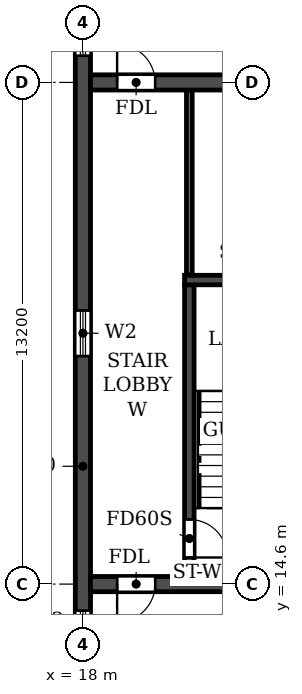
"""IFC4 building model, lengths in metres.
Left out: names, types, materials, properties, quantities, classifications, styles, units other than length and angle.
Written with IfcOpenShell. Run it as: python <this file> out.ifc"""

import sys

from ifc_helpers import new_model, si_unit, direction, frame, frame_2d, origin, place, context, subcontext, project, spatial, rectangle, extrude, element, fill, save


model = new_model("IFC4")
c1 = context("Model", 3, precision=1e-05, world=origin(), true_north=direction((0.0, 1.0)))
c2 = subcontext(c1, "Body", "Model", "MODEL_VIEW")
j1 = project(units=[si_unit("LENGTHUNIT", "METRE"), si_unit("PLANEANGLEUNIT", "RADIAN")], contexts=[c1])
p1 = place(None, origin())
s1 = spatial("IfcSite", under=j1, at=p1, CompositionType="ELEMENT")
p2 = place(p1, origin())
s2 = spatial("IfcBuilding", under=s1, at=p2, CompositionType="ELEMENT")
p3 = place(p2, frame((0.0, 0.0, 181.8)))
s3 = spatial("IfcBuildingStorey", under=s2, at=p3, CompositionType="ELEMENT", Elevation=181.8)
p4 = place(p3, frame((18.0, 4.683, 0.0), z_axis=(0.0, 0.0, 1.0), x_axis=(0.0, 1.0, 0.0)))
e1 = element("IfcWall", 1, at=p4, inside=s3, PredefinedType="SHEAR", context=c2, shape_type="SweptSolid", body=[
    extrude(rectangle(XDim=31.834, YDim=0.4, at=frame_2d((15.917, 0.0))), origin(), (0.0, 0.0, 1.0), 3.08),
])
p5 = place(p4, frame((23.817, 0.0, 0.9)))
e2 = element("IfcOpeningElement", 2, at=p5, cuts=e1, PredefinedType="OPENING", context=c2, shape_type="SweptSolid", body=[
    extrude(rectangle(XDim=1.2, YDim=1.5, at=frame_2d((0.6, 0.75))), frame((0.0, 0.21, 0.0), z_axis=(0.0, -1.0, 0.0), x_axis=(1.0, 0.0, 0.0)), (0.0, 0.0, 1.0), 0.42),
])
p6 = place(p4, frame((8.017, 0.0, 0.9)))
e3 = element("IfcOpeningElement", 3, at=p6, cuts=e1, PredefinedType="OPENING", context=c2, shape_type="SweptSolid", body=[
    extrude(rectangle(XDim=1.2, YDim=1.5, at=frame_2d((0.6, 0.75))), frame((0.0, 0.21, 0.0), z_axis=(0.0, -1.0, 0.0), x_axis=(1.0, 0.0, 0.0)), (0.0, 0.0, 1.0), 0.42),
])
p7 = place(p4, frame((27.694, 0.0, 0.6)))
e4 = element("IfcOpeningElement", 4, at=p7, cuts=e1, PredefinedType="OPENING", context=c2, shape_type="SweptSolid", body=[
    extrude(rectangle(XDim=2.2, YDim=1.8, at=frame_2d((1.1, 0.9))), frame((0.0, 0.21, 0.0), z_axis=(0.0, -1.0, 0.0), x_axis=(1.0, 0.0, 0.0)), (0.0, 0.0, 1.0), 0.42),
])
p8 = place(p4, frame((2.541, 0.0, 0.6)))
e5 = element("IfcOpeningElement", 5, at=p8, cuts=e1, PredefinedType="OPENING", context=c2, shape_type="SweptSolid", body=[
    extrude(rectangle(XDim=2.2, YDim=1.8, at=frame_2d((1.1, 0.9))), frame((0.0, 0.21, 0.0), z_axis=(0.0, -1.0, 0.0), x_axis=(1.0, 0.0, 0.0)), (0.0, 0.0, 1.0), 0.42),
])
p9 = place(p4, frame((15.917, 0.0, 0.9)))
e6 = element("IfcOpeningElement", 6, at=p9, cuts=e1, PredefinedType="OPENING", context=c2, shape_type="SweptSolid", body=[
    extrude(rectangle(XDim=1.2, YDim=1.5, at=frame_2d((0.6, 0.75))), frame((0.0, 0.21, 0.0), z_axis=(0.0, -1.0, 0.0), x_axis=(1.0, 0.0, 0.0)), (0.0, 0.0, 1.0), 0.42),
])
p10 = place(p3, frame((18.2, 14.6, 0.0), z_axis=(0.0, 0.0, 1.0), x_axis=(1.0, 0.0, 0.0)))
e7 = element("IfcWall", 7, at=p10, inside=s3, PredefinedType="SOLIDWALL", context=c2, shape_type="SweptSolid", body=[
    extrude(rectangle(XDim=65.6, YDim=0.4, at=frame_2d((32.8, 0.0))), origin(), (0.0, 0.0, 1.0), 3.08),
])
p11 = place(p10, frame((0.7, 0.0, 0.0)))
e8 = element("IfcOpeningElement", 8, at=p11, cuts=e7, PredefinedType="OPENING", context=c2, shape_type="SweptSolid", body=[
    extrude(rectangle(XDim=1.0, YDim=2.1, at=frame_2d((0.5, 1.05))), frame((0.0, 0.21, 0.0), z_axis=(0.0, -1.0, 0.0), x_axis=(1.0, 0.0, 0.0)), (0.0, 0.0, 1.0), 0.42),
])
p12 = place(p10, frame((8.6, 0.0, 0.0)))
e9 = element("IfcOpeningElement", 9, at=p12, cuts=e7, PredefinedType="OPENING", context=c2, shape_type="SweptSolid", body=[
    extrude(rectangle(XDim=1.0, YDim=2.1, at=frame_2d((0.5, 1.05))), frame((0.0, 0.21, 0.0), z_axis=(0.0, -1.0, 0.0), x_axis=(1.0, 0.0, 0.0)), (0.0, 0.0, 1.0), 0.42),
])
p13 = place(p10, frame((13.2, 0.0, 0.0)))
e10 = element("IfcOpeningElement", 10, at=p13, cuts=e7, PredefinedType="OPENING", context=c2, shape_type="SweptSolid", body=[
    extrude(rectangle(XDim=1.0, YDim=2.1, at=frame_2d((0.5, 1.05))), frame((0.0, 0.21, 0.0), z_axis=(0.0, -1.0, 0.0), x_axis=(1.0, 0.0, 0.0)), (0.0, 0.0, 1.0), 0.42),
])
p14 = place(p10, frame((24.5, 0.0, 0.0)))
e11 = element("IfcOpeningElement", 11, at=p14, cuts=e7, PredefinedType="OPENING", context=c2, shape_type="SweptSolid", body=[
    extrude(rectangle(XDim=1.0, YDim=2.1, at=frame_2d((0.5, 1.05))), frame((0.0, 0.21, 0.0), z_axis=(0.0, -1.0, 0.0), x_axis=(1.0, 0.0, 0.0)), (0.0, 0.0, 1.0), 0.42),
])
p15 = place(p10, frame((28.4, 0.0, 0.0)))
e12 = element("IfcOpeningElement", 12, at=p15, cuts=e7, PredefinedType="OPENING", context=c2, shape_type="SweptSolid", body=[
    extrude(rectangle(XDim=1.0, YDim=2.1, at=frame_2d((0.5, 1.05))), frame((0.0, 0.21, 0.0), z_axis=(0.0, -1.0, 0.0), x_axis=(1.0, 0.0, 0.0)), (0.0, 0.0, 1.0), 0.42),
])
p16 = place(p10, frame((32.3, 0.0, 0.0)))
e13 = element("IfcOpeningElement", 13, at=p16, cuts=e7, PredefinedType="OPENING", context=c2, shape_type="SweptSolid", body=[
    extrude(rectangle(XDim=1.0, YDim=2.1, at=frame_2d((0.5, 1.05))), frame((0.0, 0.21, 0.0), z_axis=(0.0, -1.0, 0.0), x_axis=(1.0, 0.0, 0.0)), (0.0, 0.0, 1.0), 0.42),
])
p17 = place(p10, frame((34.9, 0.0, 0.0)))
e14 = element("IfcOpeningElement", 14, at=p17, cuts=e7, PredefinedType="OPENING", context=c2, shape_type="SweptSolid", body=[
    extrude(rectangle(XDim=1.0, YDim=2.1, at=frame_2d((0.5, 1.05))), frame((0.0, 0.21, 0.0), z_axis=(0.0, -1.0, 0.0), x_axis=(1.0, 0.0, 0.0)), (0.0, 0.0, 1.0), 0.42),
])
p18 = place(p10, frame((38.8, 0.0, 0.0)))
e15 = element("IfcOpeningElement", 15, at=p18, cuts=e7, PredefinedType="OPENING", context=c2, shape_type="SweptSolid", body=[
    extrude(rectangle(XDim=1.0, YDim=2.1, at=frame_2d((0.5, 1.05))), frame((0.0, 0.21, 0.0), z_axis=(0.0, -1.0, 0.0), x_axis=(1.0, 0.0, 0.0)), (0.0, 0.0, 1.0), 0.42),
])
p19 = place(p10, frame((51.4, 0.0, 0.0)))
e16 = element("IfcOpeningElement", 16, at=p19, cuts=e7, PredefinedType="OPENING", context=c2, shape_type="SweptSolid", body=[
    extrude(rectangle(XDim=1.0, YDim=2.1, at=frame_2d((0.5, 1.05))), frame((0.0, 0.21, 0.0), z_axis=(0.0, -1.0, 0.0), x_axis=(1.0, 0.0, 0.0)), (0.0, 0.0, 1.0), 0.42),
])
p20 = place(p10, frame((56.0, 0.0, 0.0)))
e17 = element("IfcOpeningElement", 17, at=p20, cuts=e7, PredefinedType="OPENING", context=c2, shape_type="SweptSolid", body=[
    extrude(rectangle(XDim=1.0, YDim=2.1, at=frame_2d((0.5, 1.05))), frame((0.0, 0.21, 0.0), z_axis=(0.0, -1.0, 0.0), x_axis=(1.0, 0.0, 0.0)), (0.0, 0.0, 1.0), 0.42),
])
p21 = place(p10, frame((63.9, 0.0, 0.0)))
e18 = element("IfcOpeningElement", 18, at=p21, cuts=e7, PredefinedType="OPENING", context=c2, shape_type="SweptSolid", body=[
    extrude(rectangle(XDim=1.0, YDim=2.1, at=frame_2d((0.5, 1.05))), frame((0.0, 0.21, 0.0), z_axis=(0.0, -1.0, 0.0), x_axis=(1.0, 0.0, 0.0)), (0.0, 0.0, 1.0), 0.42),
])
p22 = place(p3, frame((18.2, 27.8, 0.0), z_axis=(0.0, 0.0, 1.0), x_axis=(1.0, 0.0, 0.0)))
e19 = element("IfcWall", 19, at=p22, inside=s3, PredefinedType="SOLIDWALL", context=c2, shape_type="SweptSolid", body=[
    extrude(rectangle(XDim=65.6, YDim=0.4, at=frame_2d((32.8, 0.0))), origin(), (0.0, 0.0, 1.0), 3.08),
])
p23 = place(p22, frame((0.7, 0.0, 0.0)))
e20 = element("IfcOpeningElement", 20, at=p23, cuts=e19, PredefinedType="OPENING", context=c2, shape_type="SweptSolid", body=[
    extrude(rectangle(XDim=1.0, YDim=2.1, at=frame_2d((0.5, 1.05))), frame((0.0, 0.21, 0.0), z_axis=(0.0, -1.0, 0.0), x_axis=(1.0, 0.0, 0.0)), (0.0, 0.0, 1.0), 0.42),
])
p24 = place(p22, frame((4.05, 0.0, 0.0)))
e21 = element("IfcOpeningElement", 21, at=p24, cuts=e19, PredefinedType="OPENING", context=c2, shape_type="SweptSolid", body=[
    extrude(rectangle(XDim=0.9, YDim=2.1, at=frame_2d((0.45, 1.05))), frame((0.0, 0.21, 0.0), z_axis=(0.0, -1.0, 0.0), x_axis=(1.0, 0.0, 0.0)), (0.0, 0.0, 1.0), 0.42),
])
p25 = place(p22, frame((13.25, 0.0, 0.0)))
e22 = element("IfcOpeningElement", 22, at=p25, cuts=e19, PredefinedType="OPENING", context=c2, shape_type="SweptSolid", body=[
    extrude(rectangle(XDim=0.9, YDim=2.1, at=frame_2d((0.45, 1.05))), frame((0.0, 0.21, 0.0), z_axis=(0.0, -1.0, 0.0), x_axis=(1.0, 0.0, 0.0)), (0.0, 0.0, 1.0), 0.42),
])
p26 = place(p22, frame((19.0, 0.0, 0.0)))
e23 = element("IfcOpeningElement", 23, at=p26, cuts=e19, PredefinedType="OPENING", context=c2, shape_type="SweptSolid", body=[
    extrude(rectangle(XDim=1.0, YDim=2.1, at=frame_2d((0.5, 1.05))), frame((0.0, 0.21, 0.0), z_axis=(0.0, -1.0, 0.0), x_axis=(1.0, 0.0, 0.0)), (0.0, 0.0, 1.0), 0.42),
])
p27 = place(p22, frame((24.2, 0.0, 0.0)))
e24 = element("IfcOpeningElement", 24, at=p27, cuts=e19, PredefinedType="OPENING", context=c2, shape_type="SweptSolid", body=[
    extrude(rectangle(XDim=1.0, YDim=2.1, at=frame_2d((0.5, 1.05))), frame((0.0, 0.21, 0.0), z_axis=(0.0, -1.0, 0.0), x_axis=(1.0, 0.0, 0.0)), (0.0, 0.0, 1.0), 0.42),
])
p28 = place(p22, frame((29.4, 0.0, 0.0)))
e25 = element("IfcOpeningElement", 25, at=p28, cuts=e19, PredefinedType="OPENING", context=c2, shape_type="SweptSolid", body=[
    extrude(rectangle(XDim=1.0, YDim=2.1, at=frame_2d((0.5, 1.05))), frame((0.0, 0.21, 0.0), z_axis=(0.0, -1.0, 0.0), x_axis=(1.0, 0.0, 0.0)), (0.0, 0.0, 1.0), 0.42),
])
p29 = place(p22, frame((32.3, 0.0, 0.0)))
e26 = element("IfcOpeningElement", 26, at=p29, cuts=e19, PredefinedType="OPENING", context=c2, shape_type="SweptSolid", body=[
    extrude(rectangle(XDim=1.0, YDim=2.1, at=frame_2d((0.5, 1.05))), frame((0.0, 0.21, 0.0), z_axis=(0.0, -1.0, 0.0), x_axis=(1.0, 0.0, 0.0)), (0.0, 0.0, 1.0), 0.42),
])
p30 = place(p22, frame((36.5, 0.0, 0.0)))
e27 = element("IfcOpeningElement", 27, at=p30, cuts=e19, PredefinedType="OPENING", context=c2, shape_type="SweptSolid", body=[
    extrude(rectangle(XDim=1.0, YDim=2.1, at=frame_2d((0.5, 1.05))), frame((0.0, 0.21, 0.0), z_axis=(0.0, -1.0, 0.0), x_axis=(1.0, 0.0, 0.0)), (0.0, 0.0, 1.0), 0.42),
])
p31 = place(p22, frame((40.4, 0.0, 0.0)))
e28 = element("IfcOpeningElement", 28, at=p31, cuts=e19, PredefinedType="OPENING", context=c2, shape_type="SweptSolid", body=[
    extrude(rectangle(XDim=1.0, YDim=2.1, at=frame_2d((0.5, 1.05))), frame((0.0, 0.21, 0.0), z_axis=(0.0, -1.0, 0.0), x_axis=(1.0, 0.0, 0.0)), (0.0, 0.0, 1.0), 0.42),
])
p32 = place(p22, frame((43.0, 0.0, 0.0)))
e29 = element("IfcOpeningElement", 29, at=p32, cuts=e19, PredefinedType="OPENING", context=c2, shape_type="SweptSolid", body=[
    extrude(rectangle(XDim=1.0, YDim=2.1, at=frame_2d((0.5, 1.05))), frame((0.0, 0.21, 0.0), z_axis=(0.0, -1.0, 0.0), x_axis=(1.0, 0.0, 0.0)), (0.0, 0.0, 1.0), 0.42),
])
p33 = place(p22, frame((46.65, 0.0, 0.0)))
e30 = element("IfcOpeningElement", 30, at=p33, cuts=e19, PredefinedType="OPENING", context=c2, shape_type="SweptSolid", body=[
    extrude(rectangle(XDim=1.5, YDim=2.1, at=frame_2d((0.75, 1.05))), frame((0.0, 0.21, 0.0), z_axis=(0.0, -1.0, 0.0), x_axis=(1.0, 0.0, 0.0)), (0.0, 0.0, 1.0), 0.42),
])
p34 = place(p22, frame((51.45, 0.0, 0.0)))
e31 = element("IfcOpeningElement", 31, at=p34, cuts=e19, PredefinedType="OPENING", context=c2, shape_type="SweptSolid", body=[
    extrude(rectangle(XDim=0.9, YDim=2.1, at=frame_2d((0.45, 1.05))), frame((0.0, 0.21, 0.0), z_axis=(0.0, -1.0, 0.0), x_axis=(1.0, 0.0, 0.0)), (0.0, 0.0, 1.0), 0.42),
])
p35 = place(p22, frame((60.65, 0.0, 0.0)))
e32 = element("IfcOpeningElement", 32, at=p35, cuts=e19, PredefinedType="OPENING", context=c2, shape_type="SweptSolid", body=[
    extrude(rectangle(XDim=0.9, YDim=2.1, at=frame_2d((0.45, 1.05))), frame((0.0, 0.21, 0.0), z_axis=(0.0, -1.0, 0.0), x_axis=(1.0, 0.0, 0.0)), (0.0, 0.0, 1.0), 0.42),
])
p36 = place(p22, frame((63.9, 0.0, 0.0)))
e33 = element("IfcOpeningElement", 33, at=p36, cuts=e19, PredefinedType="OPENING", context=c2, shape_type="SweptSolid", body=[
    extrude(rectangle(XDim=1.0, YDim=2.1, at=frame_2d((0.5, 1.05))), frame((0.0, 0.21, 0.0), z_axis=(0.0, -1.0, 0.0), x_axis=(1.0, 0.0, 0.0)), (0.0, 0.0, 1.0), 0.42),
])
p37 = place(p3, frame((20.8, 14.8, 0.0), z_axis=(0.0, 0.0, 1.0), x_axis=(0.0, 1.0, 0.0)))
e34 = element("IfcWall", 34, at=p37, inside=s3, PredefinedType="SOLIDWALL", context=c2, shape_type="SweptSolid", body=[
    extrude(rectangle(XDim=7.675, YDim=0.25, at=frame_2d((3.837, 0.0))), origin(), (0.0, 0.0, 1.0), 3.08),
])
p38 = place(p37, frame((0.5, 0.0, 0.0)))
e35 = element("IfcOpeningElement", 35, at=p38, cuts=e34, PredefinedType="OPENING", context=c2, shape_type="SweptSolid", body=[
    extrude(rectangle(XDim=1.0, YDim=2.1, at=frame_2d((0.5, 1.05))), frame((0.0, 0.135, 0.0), z_axis=(0.0, -1.0, 0.0), x_axis=(1.0, 0.0, 0.0)), (0.0, 0.0, 1.0), 0.27),
])
p39 = place(p3, frame((20.675, 22.6, 0.0), z_axis=(0.0, 0.0, 1.0), x_axis=(1.0, 0.0, 0.0)))
e36 = element("IfcWall", 36, at=p39, inside=s3, PredefinedType="SOLIDWALL", context=c2, shape_type="SweptSolid", body=[
    extrude(rectangle(XDim=4.05, YDim=0.25, at=frame_2d((2.025, 0.0))), origin(), (0.0, 0.0, 1.0), 3.08),
])
p40 = place(p3, frame((20.8, 22.735, 0.0), z_axis=(0.0, 0.0, 1.0), x_axis=(0.0, 1.0, 0.0)))
e37 = element("IfcWall", 37, at=p40, inside=s3, PredefinedType="PARTITIONING", context=c2, shape_type="SweptSolid", body=[
    extrude(rectangle(XDim=4.855, YDim=0.15, at=frame_2d((2.427, 0.0))), origin(), (0.0, 0.0, 1.0), 3.08),
])
p41 = place(p5, origin())
e38 = element("IfcWindow", 38, at=p41, inside=s3, PartitioningType="SINGLE_PANEL", PredefinedType="WINDOW", context=c2, shape_type="SweptSolid", body=[
    extrude(rectangle(XDim=1.2, YDim=1.5, at=frame_2d((0.6, 0.75))), frame((0.0, 0.03, 0.0), z_axis=(0.0, -1.0, 0.0), x_axis=(1.0, 0.0, 0.0)), (0.0, 0.0, 1.0), 0.06),
])
fill(e2, e38)
p42 = place(p6, origin())
e39 = element("IfcWindow", 39, at=p42, inside=s3, PartitioningType="SINGLE_PANEL", PredefinedType="WINDOW", context=c2, shape_type="SweptSolid", body=[
    extrude(rectangle(XDim=1.2, YDim=1.5, at=frame_2d((0.6, 0.75))), frame((0.0, 0.03, 0.0), z_axis=(0.0, -1.0, 0.0), x_axis=(1.0, 0.0, 0.0)), (0.0, 0.0, 1.0), 0.06),
])
fill(e3, e39)
p43 = place(p9, origin())
e40 = element("IfcWindow", 40, at=p43, inside=s3, PartitioningType="SINGLE_PANEL", PredefinedType="WINDOW", context=c2, shape_type="SweptSolid", body=[
    extrude(rectangle(XDim=1.2, YDim=1.5, at=frame_2d((0.6, 0.75))), frame((0.0, 0.03, 0.0), z_axis=(0.0, -1.0, 0.0), x_axis=(1.0, 0.0, 0.0)), (0.0, 0.0, 1.0), 0.06),
])
fill(e6, e40)
p44 = place(p23, origin())
e41 = element("IfcDoor", 41, at=p44, inside=s3, OperationType="SINGLE_SWING_LEFT", PredefinedType="DOOR", context=c2, shape_type="SweptSolid", body=[
    extrude(rectangle(XDim=1.0, YDim=2.1, at=frame_2d((0.5, 1.05))), frame((0.0, 0.025, 0.0), z_axis=(0.0, -1.0, 0.0), x_axis=(1.0, 0.0, 0.0)), (0.0, 0.0, 1.0), 0.05),
])
fill(e20, e41)
p45 = place(p11, frame((1.0, 0.0, 0.0), z_axis=(0.0, 0.0, 1.0), x_axis=(-1.0, 0.0, 0.0)))
e42 = element("IfcDoor", 42, at=p45, inside=s3, OperationType="SINGLE_SWING_RIGHT", PredefinedType="DOOR", context=c2, shape_type="SweptSolid", body=[
    extrude(rectangle(XDim=1.0, YDim=2.1, at=frame_2d((0.5, 1.05))), frame((0.0, 0.025, 0.0), z_axis=(0.0, -1.0, 0.0), x_axis=(1.0, 0.0, 0.0)), (0.0, 0.0, 1.0), 0.05),
])
fill(e8, e42)
p46 = place(p38, frame((1.0, 0.0, 0.0), z_axis=(0.0, 0.0, 1.0), x_axis=(-1.0, 0.0, 0.0)))
e43 = element("IfcDoor", 43, at=p46, inside=s3, OperationType="SINGLE_SWING_RIGHT", PredefinedType="DOOR", context=c2, shape_type="SweptSolid", body=[
    extrude(rectangle(XDim=1.0, YDim=2.1, at=frame_2d((0.5, 1.05))), frame((0.0, 0.025, 0.0), z_axis=(0.0, -1.0, 0.0), x_axis=(1.0, 0.0, 0.0)), (0.0, 0.0, 1.0), 0.05),
])
fill(e35, e43)
save(model, sys.argv[1])
